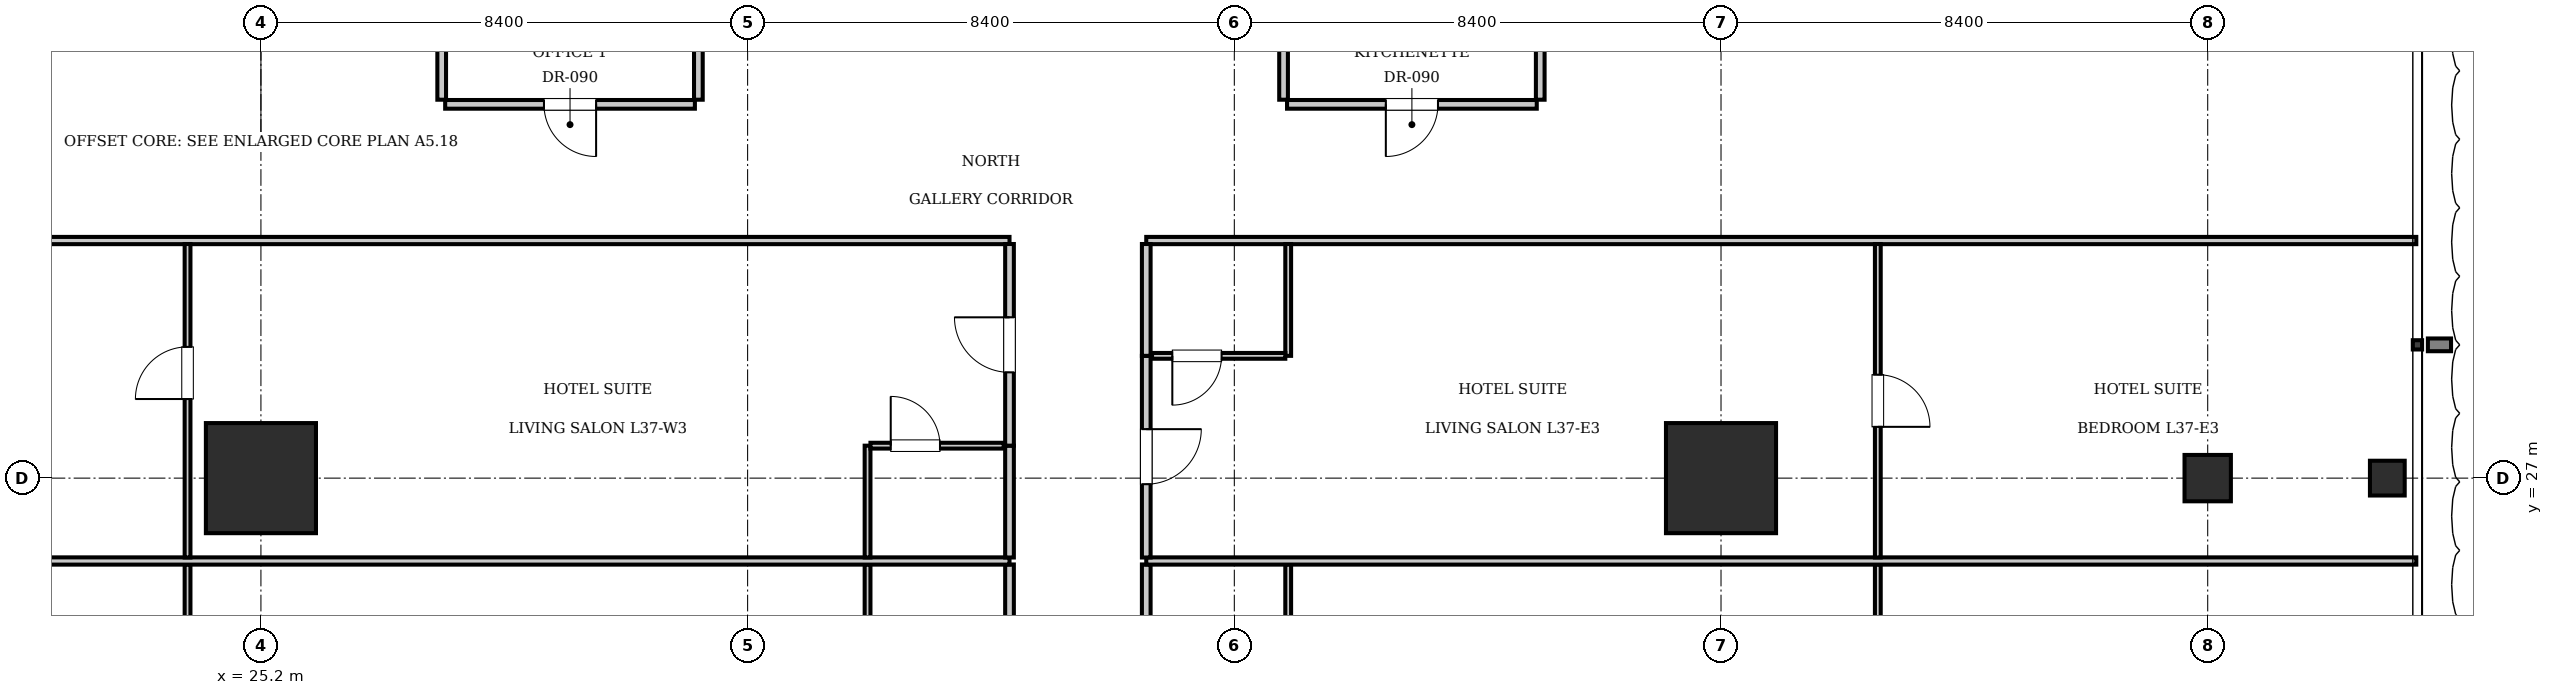
"""IFC4 building model, lengths in metres.
Left out: names, types, materials, properties, quantities, classifications, styles, units other than length and angle.
Written with IfcOpenShell. Run it as: python <this file> out.ifc"""

import sys

from ifc_helpers import new_model, si_unit, direction, frame, frame_2d, origin, origin_2d, place, context, subcontext, project, spatial, rectangle, i_section, extrude, element, fill, save


model = new_model("IFC4")
c1 = context("Model", 3, precision=1e-05, world=origin(), true_north=direction((0.0, 1.0)))
c2 = subcontext(c1, "Body", "Model", "MODEL_VIEW")
j1 = project(units=[si_unit("LENGTHUNIT", "METRE"), si_unit("PLANEANGLEUNIT", "RADIAN")], contexts=[c1])
p1 = place(None, origin())
s1 = spatial("IfcSite", under=j1, at=p1, CompositionType="ELEMENT")
p2 = place(p1, origin())
s2 = spatial("IfcBuilding", under=s1, at=p2, CompositionType="ELEMENT")
p3 = place(p2, frame((0.0, 0.0, 154.35)))
s3 = spatial("IfcBuildingStorey", under=s2, at=p3, CompositionType="ELEMENT", Elevation=154.35)
for number, where, z_axis, x_axis in (
    (1, (25.2, 27.0, 0.0), (0.0, 0.0, 1.0), (1.0, 0.0, 0.0)),
    (2, (50.4, 27.0, 0.0), (0.0, 0.0, 1.0), (1.0, 0.0, 0.0)),
):
    element("IfcColumn", number, at=place(p3, frame(where, z_axis=z_axis, x_axis=x_axis)), inside=s3, PredefinedType="COLUMN", context=c2, shape_type="SweptSolid", body=[
        extrude(rectangle(XDim=1.9, YDim=1.9, at=origin_2d()), origin(), (0.0, 0.0, 1.0), 3.85),
    ])
p4 = place(p3, frame((58.8, 27.0, 0.0), z_axis=(0.0, 0.0, 1.0), x_axis=(1.0, 0.0, 0.0)))
e3 = element("IfcColumn", 3, at=p4, inside=s3, PredefinedType="COLUMN", context=c2, shape_type="SweptSolid", body=[
    extrude(rectangle(XDim=0.8, YDim=0.8, at=origin_2d()), origin(), (0.0, 0.0, 1.0), 3.85),
])
p5 = place(p3, frame((61.9, 27.0, 0.0), z_axis=(0.0, 0.0, 1.0), x_axis=(1.0, 0.0, 0.0)))
e4 = element("IfcColumn", 4, at=p5, inside=s3, PredefinedType="COLUMN", context=c2, shape_type="SweptSolid", body=[
    extrude(i_section(OverallWidth=0.6, OverallDepth=0.6, WebThickness=0.025, FlangeThickness=0.038, at=origin_2d()), origin(), (0.0, 0.0, 1.0), 3.85),
])
for number, where, z_axis, x_axis in (
    (5, (28.32, 33.53, 0.0), (0.0, 0.0, 1.0), (0.0, 1.0, 0.0)),
    (6, (32.75, 33.53, 0.0), (0.0, 0.0, 1.0), (0.0, 1.0, 0.0)),
):
    element("IfcWall", number, at=place(p3, frame(where, z_axis=z_axis, x_axis=x_axis)), inside=s3, PredefinedType="PARTITIONING", context=c2, shape_type="SweptSolid", body=[
        extrude(rectangle(XDim=2.59, YDim=0.15, at=frame_2d((1.295, 0.0))), origin(), (0.0, 0.0, 1.0), 3.61),
    ])
p6 = place(p3, frame((28.38, 33.45, 0.0), z_axis=(0.0, 0.0, 1.0), x_axis=(1.0, 0.0, 0.0)))
e7 = element("IfcWall", 7, at=p6, inside=s3, PredefinedType="PARTITIONING", context=c2, shape_type="SweptSolid", body=[
    extrude(rectangle(XDim=4.31, YDim=0.15, at=frame_2d((2.155, 0.0))), origin(), (0.0, 0.0, 1.0), 3.61),
])
p7 = place(p6, frame((1.705, 0.0, 0.0)))
e8 = element("IfcOpeningElement", 8, at=p7, cuts=e7, PredefinedType="OPENING", context=c2, shape_type="SweptSolid", body=[
    extrude(rectangle(XDim=0.9, YDim=2.1, at=frame_2d((0.45, 1.05))), frame((0.0, 0.085, 0.0), z_axis=(0.0, -1.0, 0.0), x_axis=(1.0, 0.0, 0.0)), (0.0, 0.0, 1.0), 0.17),
])
for number, where, z_axis, x_axis in (
    (9, (42.85, 33.53, 0.0), (0.0, 0.0, 1.0), (0.0, 1.0, 0.0)),
    (10, (47.28, 33.53, 0.0), (0.0, 0.0, 1.0), (0.0, 1.0, 0.0)),
):
    element("IfcWall", number, at=place(p3, frame(where, z_axis=z_axis, x_axis=x_axis)), inside=s3, PredefinedType="PARTITIONING", context=c2, shape_type="SweptSolid", body=[
        extrude(rectangle(XDim=2.59, YDim=0.15, at=frame_2d((1.295, 0.0))), origin(), (0.0, 0.0, 1.0), 3.61),
    ])
p8 = place(p3, frame((42.91, 33.45, 0.0), z_axis=(0.0, 0.0, 1.0), x_axis=(1.0, 0.0, 0.0)))
e11 = element("IfcWall", 11, at=p8, inside=s3, PredefinedType="PARTITIONING", context=c2, shape_type="SweptSolid", body=[
    extrude(rectangle(XDim=4.31, YDim=0.15, at=frame_2d((2.155, 0.0))), origin(), (0.0, 0.0, 1.0), 3.61),
])
p9 = place(p8, frame((1.705, 0.0, 0.0)))
e12 = element("IfcOpeningElement", 12, at=p9, cuts=e11, PredefinedType="OPENING", context=c2, shape_type="SweptSolid", body=[
    extrude(rectangle(XDim=0.9, YDim=2.1, at=frame_2d((0.45, 1.05))), frame((0.0, 0.085, 0.0), z_axis=(0.0, -1.0, 0.0), x_axis=(1.0, 0.0, 0.0)), (0.0, 0.0, 1.0), 0.17),
])
p10 = place(p3, frame((13.2, 31.1, 0.0), z_axis=(0.0, 0.0, 1.0), x_axis=(1.0, 0.0, 0.0)))
e13 = element("IfcWall", 13, at=p10, inside=s3, PredefinedType="PARTITIONING", context=c2, shape_type="SweptSolid", body=[
    extrude(rectangle(XDim=24.92, YDim=0.125, at=frame_2d((12.46, 0.0))), origin(), (0.0, 0.0, 1.0), 3.61),
])
p11 = place(p3, frame((40.48, 31.1, 0.0), z_axis=(0.0, 0.0, 1.0), x_axis=(1.0, 0.0, 0.0)))
e14 = element("IfcWall", 14, at=p11, inside=s3, PredefinedType="PARTITIONING", context=c2, shape_type="SweptSolid", body=[
    extrude(rectangle(XDim=21.92, YDim=0.125, at=frame_2d((10.96, 0.0))), origin(), (0.0, 0.0, 1.0), 3.61),
])
p12 = place(p3, frame((38.12, 23.58, 0.0), z_axis=(0.0, 0.0, 1.0), x_axis=(0.0, 1.0, 0.0)))
e15 = element("IfcWall", 15, at=p12, inside=s3, PredefinedType="PARTITIONING", context=c2, shape_type="SweptSolid", body=[
    extrude(rectangle(XDim=1.93, YDim=0.15, at=frame_2d((0.965, 0.0))), origin(), (0.0, 0.0, 1.0), 3.61),
])
p13 = place(p3, frame((35.67, 23.58, 0.0), z_axis=(0.0, 0.0, 1.0), x_axis=(0.0, 1.0, 0.0)))
e16 = element("IfcWall", 16, at=p13, inside=s3, PredefinedType="PARTITIONING", context=c2, shape_type="SweptSolid", body=[
    extrude(rectangle(XDim=1.93, YDim=0.1, at=frame_2d((0.965, 0.0))), origin(), (0.0, 0.0, 1.0), 3.61),
])
p14 = place(p3, frame((23.934, 20.09, 0.0), z_axis=(0.0, 0.0, 1.0), x_axis=(0.0, 1.0, 0.0)))
e17 = element("IfcWall", 17, at=p14, inside=s3, PredefinedType="PARTITIONING", context=c2, shape_type="SweptSolid", body=[
    extrude(rectangle(XDim=5.42, YDim=0.1, at=frame_2d((2.71, 0.0))), origin(), (0.0, 0.0, 1.0), 3.61),
])
p15 = place(p14, frame((2.26, 0.0, 0.0)))
e18 = element("IfcOpeningElement", 18, at=p15, cuts=e17, PredefinedType="OPENING", context=c2, shape_type="SweptSolid", body=[
    extrude(rectangle(XDim=0.9, YDim=2.1, at=frame_2d((0.45, 1.05))), frame((0.0, 0.06, 0.0), z_axis=(0.0, -1.0, 0.0), x_axis=(1.0, 0.0, 0.0)), (0.0, 0.0, 1.0), 0.12),
])
p16 = place(p3, frame((40.48, 23.58, 0.0), z_axis=(0.0, 0.0, 1.0), x_axis=(0.0, 1.0, 0.0)))
e19 = element("IfcWall", 19, at=p16, inside=s3, PredefinedType="PARTITIONING", context=c2, shape_type="SweptSolid", body=[
    extrude(rectangle(XDim=1.93, YDim=0.15, at=frame_2d((0.965, 0.0))), origin(), (0.0, 0.0, 1.0), 3.61),
])
p17 = place(p3, frame((42.93, 23.58, 0.0), z_axis=(0.0, 0.0, 1.0), x_axis=(0.0, 1.0, 0.0)))
e20 = element("IfcWall", 20, at=p17, inside=s3, PredefinedType="PARTITIONING", context=c2, shape_type="SweptSolid", body=[
    extrude(rectangle(XDim=1.93, YDim=0.1, at=frame_2d((0.965, 0.0))), origin(), (0.0, 0.0, 1.0), 3.61),
])
p18 = place(p3, frame((53.106, 20.09, 0.0), z_axis=(0.0, 0.0, 1.0), x_axis=(0.0, 1.0, 0.0)))
e21 = element("IfcWall", 21, at=p18, inside=s3, PredefinedType="PARTITIONING", context=c2, shape_type="SweptSolid", body=[
    extrude(rectangle(XDim=5.42, YDim=0.1, at=frame_2d((2.71, 0.0))), origin(), (0.0, 0.0, 1.0), 3.61),
])
p19 = place(p18, frame((2.26, 0.0, 0.0)))
e22 = element("IfcOpeningElement", 22, at=p19, cuts=e21, PredefinedType="OPENING", context=c2, shape_type="SweptSolid", body=[
    extrude(rectangle(XDim=0.9, YDim=2.1, at=frame_2d((0.45, 1.05))), frame((0.0, 0.06, 0.0), z_axis=(0.0, -1.0, 0.0), x_axis=(1.0, 0.0, 0.0)), (0.0, 0.0, 1.0), 0.12),
])
p20 = place(p3, frame((13.2, 25.57, 0.0), z_axis=(0.0, 0.0, 1.0), x_axis=(1.0, 0.0, 0.0)))
e23 = element("IfcWall", 23, at=p20, inside=s3, PredefinedType="PARTITIONING", context=c2, shape_type="SweptSolid", body=[
    extrude(rectangle(XDim=24.92, YDim=0.125, at=frame_2d((12.46, 0.0))), origin(), (0.0, 0.0, 1.0), 3.61),
])
p21 = place(p3, frame((40.48, 25.57, 0.0), z_axis=(0.0, 0.0, 1.0), x_axis=(1.0, 0.0, 0.0)))
e24 = element("IfcWall", 24, at=p21, inside=s3, PredefinedType="PARTITIONING", context=c2, shape_type="SweptSolid", body=[
    extrude(rectangle(XDim=21.92, YDim=0.125, at=frame_2d((10.96, 0.0))), origin(), (0.0, 0.0, 1.0), 3.61),
])
p22 = place(p3, frame((38.12, 25.63, 0.0), z_axis=(0.0, 0.0, 1.0), x_axis=(0.0, 1.0, 0.0)))
e25 = element("IfcWall", 25, at=p22, inside=s3, PredefinedType="PARTITIONING", context=c2, shape_type="SweptSolid", body=[
    extrude(rectangle(XDim=1.93, YDim=0.15, at=frame_2d((0.965, 0.0))), origin(), (0.0, 0.0, 1.0), 3.61),
])
p23 = place(p3, frame((38.12, 27.56, 0.0), z_axis=(0.0, 0.0, 1.0), x_axis=(0.0, 1.0, 0.0)))
e26 = element("IfcWall", 26, at=p23, inside=s3, PredefinedType="PARTITIONING", context=c2, shape_type="SweptSolid", body=[
    extrude(rectangle(XDim=3.48, YDim=0.15, at=frame_2d((1.74, 0.0))), origin(), (0.0, 0.0, 1.0), 3.61),
])
p24 = place(p23, frame((1.265, 0.0, 0.0)))
e27 = element("IfcOpeningElement", 27, at=p24, cuts=e26, PredefinedType="OPENING", context=c2, shape_type="SweptSolid", body=[
    extrude(rectangle(XDim=0.95, YDim=2.15, at=frame_2d((0.475, 1.075))), frame((0.0, 0.085, 0.0), z_axis=(0.0, -1.0, 0.0), x_axis=(1.0, 0.0, 0.0)), (0.0, 0.0, 1.0), 0.17),
])
p25 = place(p3, frame((35.67, 25.63, 0.0), z_axis=(0.0, 0.0, 1.0), x_axis=(0.0, 1.0, 0.0)))
e28 = element("IfcWall", 28, at=p25, inside=s3, PredefinedType="PARTITIONING", context=c2, shape_type="SweptSolid", body=[
    extrude(rectangle(XDim=1.93, YDim=0.1, at=frame_2d((0.965, 0.0))), origin(), (0.0, 0.0, 1.0), 3.61),
])
p26 = place(p3, frame((35.72, 27.56, 0.0), z_axis=(0.0, 0.0, 1.0), x_axis=(1.0, 0.0, 0.0)))
e29 = element("IfcWall", 29, at=p26, inside=s3, PredefinedType="PARTITIONING", context=c2, shape_type="SweptSolid", body=[
    extrude(rectangle(XDim=2.3, YDim=0.1, at=frame_2d((1.15, 0.0))), origin(), (0.0, 0.0, 1.0), 3.61),
])
p27 = place(p26, frame((0.35, 0.0, 0.0)))
e30 = element("IfcOpeningElement", 30, at=p27, cuts=e29, PredefinedType="OPENING", context=c2, shape_type="SweptSolid", body=[
    extrude(rectangle(XDim=0.85, YDim=2.1, at=frame_2d((0.425, 1.05))), frame((0.0, 0.06, 0.0), z_axis=(0.0, -1.0, 0.0), x_axis=(1.0, 0.0, 0.0)), (0.0, 0.0, 1.0), 0.12),
])
p28 = place(p3, frame((23.934, 25.63, 0.0), z_axis=(0.0, 0.0, 1.0), x_axis=(0.0, 1.0, 0.0)))
e31 = element("IfcWall", 31, at=p28, inside=s3, PredefinedType="PARTITIONING", context=c2, shape_type="SweptSolid", body=[
    extrude(rectangle(XDim=5.41, YDim=0.1, at=frame_2d((2.705, 0.0))), origin(), (0.0, 0.0, 1.0), 3.61),
])
p29 = place(p28, frame((2.735, 0.0, 0.0)))
e32 = element("IfcOpeningElement", 32, at=p29, cuts=e31, PredefinedType="OPENING", context=c2, shape_type="SweptSolid", body=[
    extrude(rectangle(XDim=0.9, YDim=2.1, at=frame_2d((0.45, 1.05))), frame((0.0, 0.06, 0.0), z_axis=(0.0, -1.0, 0.0), x_axis=(1.0, 0.0, 0.0)), (0.0, 0.0, 1.0), 0.12),
])
p30 = place(p3, frame((40.48, 25.63, 0.0), z_axis=(0.0, 0.0, 1.0), x_axis=(0.0, 1.0, 0.0)))
e33 = element("IfcWall", 33, at=p30, inside=s3, PredefinedType="PARTITIONING", context=c2, shape_type="SweptSolid", body=[
    extrude(rectangle(XDim=3.48, YDim=0.15, at=frame_2d((1.74, 0.0))), origin(), (0.0, 0.0, 1.0), 3.61),
])
p31 = place(p30, frame((1.265, 0.0, 0.0)))
e34 = element("IfcOpeningElement", 34, at=p31, cuts=e33, PredefinedType="OPENING", context=c2, shape_type="SweptSolid", body=[
    extrude(rectangle(XDim=0.95, YDim=2.15, at=frame_2d((0.475, 1.075))), frame((0.0, 0.085, 0.0), z_axis=(0.0, -1.0, 0.0), x_axis=(1.0, 0.0, 0.0)), (0.0, 0.0, 1.0), 0.17),
])
p32 = place(p3, frame((40.48, 29.11, 0.0), z_axis=(0.0, 0.0, 1.0), x_axis=(0.0, 1.0, 0.0)))
e35 = element("IfcWall", 35, at=p32, inside=s3, PredefinedType="PARTITIONING", context=c2, shape_type="SweptSolid", body=[
    extrude(rectangle(XDim=1.93, YDim=0.15, at=frame_2d((0.965, 0.0))), origin(), (0.0, 0.0, 1.0), 3.61),
])
p33 = place(p3, frame((42.93, 29.11, 0.0), z_axis=(0.0, 0.0, 1.0), x_axis=(0.0, 1.0, 0.0)))
e36 = element("IfcWall", 36, at=p33, inside=s3, PredefinedType="PARTITIONING", context=c2, shape_type="SweptSolid", body=[
    extrude(rectangle(XDim=1.93, YDim=0.1, at=frame_2d((0.965, 0.0))), origin(), (0.0, 0.0, 1.0), 3.61),
])
p34 = place(p3, frame((40.58, 29.11, 0.0), z_axis=(0.0, 0.0, 1.0), x_axis=(1.0, 0.0, 0.0)))
e37 = element("IfcWall", 37, at=p34, inside=s3, PredefinedType="PARTITIONING", context=c2, shape_type="SweptSolid", body=[
    extrude(rectangle(XDim=2.3, YDim=0.1, at=frame_2d((1.15, 0.0))), origin(), (0.0, 0.0, 1.0), 3.61),
])
p35 = place(p34, frame((0.35, 0.0, 0.0)))
e38 = element("IfcOpeningElement", 38, at=p35, cuts=e37, PredefinedType="OPENING", context=c2, shape_type="SweptSolid", body=[
    extrude(rectangle(XDim=0.85, YDim=2.1, at=frame_2d((0.425, 1.05))), frame((0.0, 0.06, 0.0), z_axis=(0.0, -1.0, 0.0), x_axis=(1.0, 0.0, 0.0)), (0.0, 0.0, 1.0), 0.12),
])
p36 = place(p3, frame((53.106, 25.63, 0.0), z_axis=(0.0, 0.0, 1.0), x_axis=(0.0, 1.0, 0.0)))
e39 = element("IfcWall", 39, at=p36, inside=s3, PredefinedType="PARTITIONING", context=c2, shape_type="SweptSolid", body=[
    extrude(rectangle(XDim=5.41, YDim=0.1, at=frame_2d((2.705, 0.0))), origin(), (0.0, 0.0, 1.0), 3.61),
])
p37 = place(p36, frame((2.255, 0.0, 0.0)))
e40 = element("IfcOpeningElement", 40, at=p37, cuts=e39, PredefinedType="OPENING", context=c2, shape_type="SweptSolid", body=[
    extrude(rectangle(XDim=0.9, YDim=2.1, at=frame_2d((0.45, 1.05))), frame((0.0, 0.06, 0.0), z_axis=(0.0, -1.0, 0.0), x_axis=(1.0, 0.0, 0.0)), (0.0, 0.0, 1.0), 0.12),
])
p38 = place(p7, frame((0.9, 0.0, 0.0), z_axis=(0.0, 0.0, 1.0), x_axis=(-1.0, 0.0, 0.0)))
e41 = element("IfcDoor", 41, at=p38, inside=s3, OperationType="SINGLE_SWING_LEFT", PredefinedType="DOOR", context=c2, shape_type="SweptSolid", body=[
    extrude(rectangle(XDim=0.9, YDim=2.1, at=frame_2d((0.45, 1.05))), frame((0.0, 0.025, 0.0), z_axis=(0.0, -1.0, 0.0), x_axis=(1.0, 0.0, 0.0)), (0.0, 0.0, 1.0), 0.05),
])
fill(e8, e41)
p39 = place(p9, frame((0.9, 0.0, 0.0), z_axis=(0.0, 0.0, 1.0), x_axis=(-1.0, 0.0, 0.0)))
e42 = element("IfcDoor", 42, at=p39, inside=s3, OperationType="SINGLE_SWING_RIGHT", PredefinedType="DOOR", context=c2, shape_type="SweptSolid", body=[
    extrude(rectangle(XDim=0.9, YDim=2.1, at=frame_2d((0.45, 1.05))), frame((0.0, 0.025, 0.0), z_axis=(0.0, -1.0, 0.0), x_axis=(1.0, 0.0, 0.0)), (0.0, 0.0, 1.0), 0.05),
])
fill(e12, e42)
p40 = place(p27, origin())
e43 = element("IfcDoor", 43, at=p40, inside=s3, OperationType="SINGLE_SWING_LEFT", PredefinedType="DOOR", context=c2, shape_type="SweptSolid", body=[
    extrude(rectangle(XDim=0.85, YDim=2.1, at=frame_2d((0.425, 1.05))), frame((0.0, 0.025, 0.0), z_axis=(0.0, -1.0, 0.0), x_axis=(1.0, 0.0, 0.0)), (0.0, 0.0, 1.0), 0.05),
])
fill(e30, e43)
p41 = place(p24, origin())
e44 = element("IfcDoor", 44, at=p41, inside=s3, OperationType="SINGLE_SWING_RIGHT", PredefinedType="DOOR", context=c2, shape_type="SweptSolid", body=[
    extrude(rectangle(XDim=0.95, YDim=2.15, at=frame_2d((0.475, 1.075))), frame((0.0, 0.025, 0.0), z_axis=(0.0, -1.0, 0.0), x_axis=(1.0, 0.0, 0.0)), (0.0, 0.0, 1.0), 0.05),
])
fill(e27, e44)
p42 = place(p29, origin())
e45 = element("IfcDoor", 45, at=p42, inside=s3, OperationType="SINGLE_SWING_LEFT", PredefinedType="DOOR", context=c2, shape_type="SweptSolid", body=[
    extrude(rectangle(XDim=0.9, YDim=2.1, at=frame_2d((0.45, 1.05))), frame((0.0, 0.025, 0.0), z_axis=(0.0, -1.0, 0.0), x_axis=(1.0, 0.0, 0.0)), (0.0, 0.0, 1.0), 0.05),
])
fill(e32, e45)
p43 = place(p35, frame((0.85, 0.0, 0.0), z_axis=(0.0, 0.0, 1.0), x_axis=(-1.0, 0.0, 0.0)))
e46 = element("IfcDoor", 46, at=p43, inside=s3, OperationType="SINGLE_SWING_RIGHT", PredefinedType="DOOR", context=c2, shape_type="SweptSolid", body=[
    extrude(rectangle(XDim=0.85, YDim=2.1, at=frame_2d((0.425, 1.05))), frame((0.0, 0.025, 0.0), z_axis=(0.0, -1.0, 0.0), x_axis=(1.0, 0.0, 0.0)), (0.0, 0.0, 1.0), 0.05),
])
fill(e38, e46)
p44 = place(p31, frame((0.95, 0.0, 0.0), z_axis=(0.0, 0.0, 1.0), x_axis=(-1.0, 0.0, 0.0)))
e47 = element("IfcDoor", 47, at=p44, inside=s3, OperationType="SINGLE_SWING_LEFT", PredefinedType="DOOR", context=c2, shape_type="SweptSolid", body=[
    extrude(rectangle(XDim=0.95, YDim=2.15, at=frame_2d((0.475, 1.075))), frame((0.0, 0.025, 0.0), z_axis=(0.0, -1.0, 0.0), x_axis=(1.0, 0.0, 0.0)), (0.0, 0.0, 1.0), 0.05),
])
fill(e34, e47)
p45 = place(p37, frame((0.9, 0.0, 0.0), z_axis=(0.0, 0.0, 1.0), x_axis=(-1.0, 0.0, 0.0)))
e48 = element("IfcDoor", 48, at=p45, inside=s3, OperationType="SINGLE_SWING_RIGHT", PredefinedType="DOOR", context=c2, shape_type="SweptSolid", body=[
    extrude(rectangle(XDim=0.9, YDim=2.1, at=frame_2d((0.45, 1.05))), frame((0.0, 0.025, 0.0), z_axis=(0.0, -1.0, 0.0), x_axis=(1.0, 0.0, 0.0)), (0.0, 0.0, 1.0), 0.05),
])
fill(e40, e48)
save(model, sys.argv[1])
